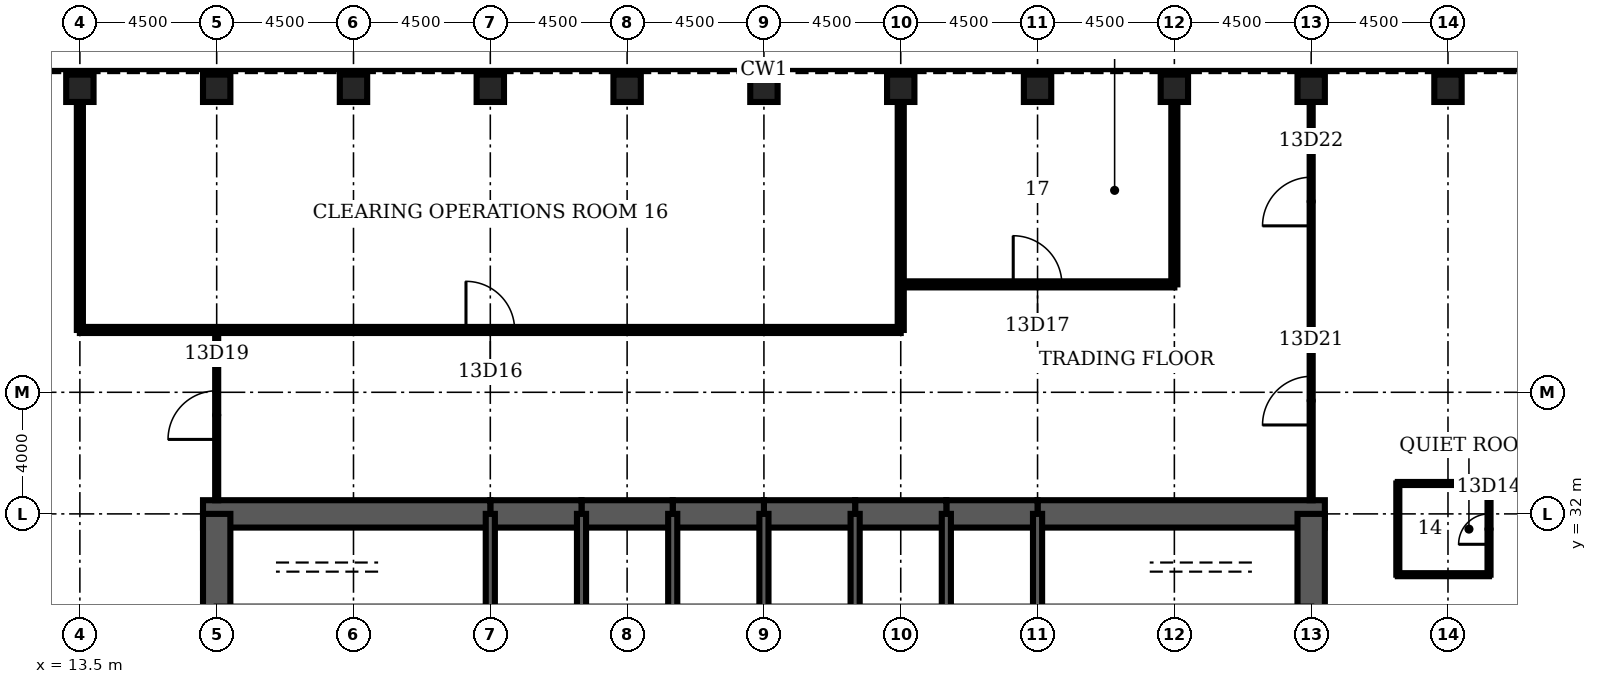
"""IFC4 building model, lengths in metres.
Left out: names, types, materials, properties, quantities, classifications, styles, units other than length and angle.
Written with IfcOpenShell. Run it as: python <this file> out.ifc"""

import sys

from ifc_helpers import new_model, si_unit, direction, frame, frame_2d, origin, origin_2d, place, context, subcontext, project, spatial, rectangle, hollow_rectangle, extrude, element, fill, save


model = new_model("IFC4")
c1 = context("Model", 3, precision=1e-05, world=origin(), true_north=direction((0.0, 1.0)))
c2 = subcontext(c1, "Body", "Model", "MODEL_VIEW")
j1 = project(units=[si_unit("LENGTHUNIT", "METRE"), si_unit("PLANEANGLEUNIT", "RADIAN")], contexts=[c1])
p1 = place(None, origin())
s1 = spatial("IfcSite", under=j1, at=p1, CompositionType="ELEMENT")
p2 = place(p1, origin())
s2 = spatial("IfcBuilding", under=s1, at=p2, CompositionType="ELEMENT")
p3 = place(p2, frame((0.0, 0.0, 63.5)))
s3 = spatial("IfcBuildingStorey", under=s2, at=p3, CompositionType="ELEMENT", Elevation=63.5)
for number, where, z_axis, x_axis in (
    (1, (58.5, 46.0, 0.0), (0.0, 0.0, 1.0), (0.0, 1.0, 0.0)),
    (2, (54.0, 46.0, 0.0), (0.0, 0.0, 1.0), (0.0, 1.0, 0.0)),
    (3, (49.5, 46.0, 0.0), (0.0, 0.0, 1.0), (0.0, 1.0, 0.0)),
    (4, (45.0, 46.0, 0.0), (0.0, 0.0, 1.0), (0.0, 1.0, 0.0)),
    (5, (40.5, 46.0, 0.0), (0.0, 0.0, 1.0), (0.0, 1.0, 0.0)),
    (6, (36.0, 46.0, 0.0), (0.0, 0.0, 1.0), (0.0, 1.0, 0.0)),
    (7, (31.5, 46.0, 0.0), (0.0, 0.0, 1.0), (0.0, 1.0, 0.0)),
    (8, (27.0, 46.0, 0.0), (0.0, 0.0, 1.0), (0.0, 1.0, 0.0)),
    (9, (22.5, 46.0, 0.0), (0.0, 0.0, 1.0), (0.0, 1.0, 0.0)),
    (10, (18.0, 46.0, 0.0), (0.0, 0.0, 1.0), (0.0, 1.0, 0.0)),
    (11, (13.5, 46.0, 0.0), (0.0, 0.0, 1.0), (0.0, 1.0, 0.0)),
):
    element("IfcColumn", number, at=place(p3, frame(where, z_axis=z_axis, x_axis=x_axis)), inside=s3, PredefinedType="COLUMN", context=c2, shape_type="SweptSolid", body=[
        extrude(hollow_rectangle(XDim=0.9, YDim=0.9, WallThickness=0.12, at=origin_2d()), origin(), (0.0, 0.0, 1.0), 4.5),
    ])
p4 = place(p3, frame((54.45, 32.0, 0.0), z_axis=(0.0, 0.0, 1.0), x_axis=(-1.0, 0.0, 0.0)))
e12 = element("IfcWall", 12, at=p4, inside=s3, PredefinedType="SHEAR", context=c2, shape_type="SweptSolid", body=[
    extrude(rectangle(XDim=9.45, YDim=0.9, at=frame_2d((4.725, 0.0))), origin(), (0.0, 0.0, 1.0), 4.5),
])
for number, where, z_axis, x_axis in (
    (13, (45.0, 32.0, 0.0), (0.0, 0.0, 1.0), (-1.0, 0.0, 0.0)),
    (14, (42.0, 32.0, 0.0), (0.0, 0.0, 1.0), (-1.0, 0.0, 0.0)),
    (15, (39.0, 32.0, 0.0), (0.0, 0.0, 1.0), (-1.0, 0.0, 0.0)),
    (16, (36.0, 32.0, 0.0), (0.0, 0.0, 1.0), (-1.0, 0.0, 0.0)),
    (17, (33.0, 32.0, 0.0), (0.0, 0.0, 1.0), (-1.0, 0.0, 0.0)),
    (18, (30.0, 32.0, 0.0), (0.0, 0.0, 1.0), (-1.0, 0.0, 0.0)),
):
    element("IfcWall", number, at=place(p3, frame(where, z_axis=z_axis, x_axis=x_axis)), inside=s3, PredefinedType="SHEAR", context=c2, shape_type="SweptSolid", body=[
        extrude(rectangle(XDim=3.0, YDim=0.9, at=frame_2d((1.5, 0.0))), origin(), (0.0, 0.0, 1.0), 4.5),
    ])
p5 = place(p3, frame((27.0, 32.0, 0.0), z_axis=(0.0, 0.0, 1.0), x_axis=(-1.0, 0.0, 0.0)))
e19 = element("IfcWall", 19, at=p5, inside=s3, PredefinedType="SHEAR", context=c2, shape_type="SweptSolid", body=[
    extrude(rectangle(XDim=9.45, YDim=0.9, at=frame_2d((4.725, 0.0))), origin(), (0.0, 0.0, 1.0), 4.5),
])
for number, where, z_axis, x_axis in (
    (20, (18.0, 32.0, 0.0), (0.0, 0.0, 1.0), (0.0, -1.0, 0.0)),
    (21, (54.0, 28.8, 0.0), (0.0, 0.0, 1.0), (0.0, 1.0, 0.0)),
):
    element("IfcWall", number, at=place(p3, frame(where, z_axis=z_axis, x_axis=x_axis)), inside=s3, PredefinedType="SHEAR", context=c2, shape_type="SweptSolid", body=[
        extrude(rectangle(XDim=3.2, YDim=0.9, at=frame_2d((1.6, 0.0))), origin(), (0.0, 0.0, 1.0), 4.5),
    ])
for number, where, z_axis, x_axis in (
    (22, (27.0, 28.8, 0.0), (0.0, 0.0, 1.0), (0.0, 1.0, 0.0)),
    (23, (30.0, 28.8, 0.0), (0.0, 0.0, 1.0), (0.0, 1.0, 0.0)),
    (24, (33.0, 28.8, 0.0), (0.0, 0.0, 1.0), (0.0, 1.0, 0.0)),
    (25, (36.0, 28.8, 0.0), (0.0, 0.0, 1.0), (0.0, 1.0, 0.0)),
    (26, (39.0, 28.8, 0.0), (0.0, 0.0, 1.0), (0.0, 1.0, 0.0)),
    (27, (42.0, 28.8, 0.0), (0.0, 0.0, 1.0), (0.0, 1.0, 0.0)),
    (28, (45.0, 28.8, 0.0), (0.0, 0.0, 1.0), (0.0, 1.0, 0.0)),
):
    element("IfcWall", number, at=place(p3, frame(where, z_axis=z_axis, x_axis=x_axis)), inside=s3, PredefinedType="SOLIDWALL", context=c2, shape_type="SweptSolid", body=[
        extrude(rectangle(XDim=3.2, YDim=0.3, at=frame_2d((1.6, 0.0))), origin(), (0.0, 0.0, 1.0), 4.5),
    ])
for number, where, z_axis, x_axis in (
    (29, (56.85, 30.0, 0.0), (0.0, 0.0, 1.0), (1.0, 0.0, 0.0)),
    (30, (56.85, 33.0, 0.0), (0.0, 0.0, 1.0), (1.0, 0.0, 0.0)),
):
    element("IfcWall", number, at=place(p3, frame(where, z_axis=z_axis, x_axis=x_axis)), inside=s3, PredefinedType="PARTITIONING", context=c2, shape_type="SweptSolid", body=[
        extrude(rectangle(XDim=3.0, YDim=0.1, at=frame_2d((1.5, 0.0))), origin(), (0.0, 0.0, 1.0), 3.0),
    ])
p6 = place(p3, frame((13.5, 38.05, 0.0), z_axis=(0.0, 0.0, 1.0), x_axis=(1.0, 0.0, 0.0)))
e31 = element("IfcWall", 31, at=p6, inside=s3, PredefinedType="PARTITIONING", context=c2, shape_type="SweptSolid", body=[
    extrude(rectangle(XDim=27.0, YDim=0.2, at=frame_2d((13.5, 0.0))), origin(), (0.0, 0.0, 1.0), 3.0),
])
p7 = place(p6, frame((12.7, 0.0, 0.0)))
e32 = element("IfcOpeningElement", 32, at=p7, cuts=e31, PredefinedType="OPENING", context=c2, shape_type="SweptSolid", body=[
    extrude(rectangle(XDim=1.6, YDim=2.1, at=frame_2d((0.8, 1.05))), frame((0.0, 0.11, 0.0), z_axis=(0.0, -1.0, 0.0), x_axis=(1.0, 0.0, 0.0)), (0.0, 0.0, 1.0), 0.22),
])
p8 = place(p3, frame((40.5, 39.55, 0.0), z_axis=(0.0, 0.0, 1.0), x_axis=(1.0, 0.0, 0.0)))
e33 = element("IfcWall", 33, at=p8, inside=s3, PredefinedType="PARTITIONING", context=c2, shape_type="SweptSolid", body=[
    extrude(rectangle(XDim=9.0, YDim=0.2, at=frame_2d((4.5, 0.0))), origin(), (0.0, 0.0, 1.0), 3.0),
])
p9 = place(p8, frame((3.7, 0.0, 0.0)))
e34 = element("IfcOpeningElement", 34, at=p9, cuts=e33, PredefinedType="OPENING", context=c2, shape_type="SweptSolid", body=[
    extrude(rectangle(XDim=1.6, YDim=2.1, at=frame_2d((0.8, 1.05))), frame((0.0, 0.11, 0.0), z_axis=(0.0, -1.0, 0.0), x_axis=(1.0, 0.0, 0.0)), (0.0, 0.0, 1.0), 0.22),
])
p10 = place(p3, frame((13.5, 38.05, 0.0), z_axis=(0.0, 0.0, 1.0), x_axis=(0.0, 1.0, 0.0)))
e35 = element("IfcWall", 35, at=p10, inside=s3, PredefinedType="PARTITIONING", context=c2, shape_type="SweptSolid", body=[
    extrude(rectangle(XDim=7.5, YDim=0.2, at=frame_2d((3.75, 0.0))), origin(), (0.0, 0.0, 1.0), 3.0),
])
p11 = place(p3, frame((18.0, 32.45, 0.0), z_axis=(0.0, 0.0, 1.0), x_axis=(0.0, 1.0, 0.0)))
e36 = element("IfcWall", 36, at=p11, inside=s3, PredefinedType="PARTITIONING", context=c2, shape_type="SweptSolid", body=[
    extrude(rectangle(XDim=5.6, YDim=0.1, at=frame_2d((2.8, 0.0))), origin(), (0.0, 0.0, 1.0), 3.0),
])
p12 = place(p11, frame((2.0, 0.0, 0.0)))
e37 = element("IfcOpeningElement", 37, at=p12, cuts=e36, PredefinedType="OPENING", context=c2, shape_type="SweptSolid", body=[
    extrude(rectangle(XDim=1.6, YDim=2.1, at=frame_2d((0.8, 1.05))), frame((0.0, 0.06, 0.0), z_axis=(0.0, -1.0, 0.0), x_axis=(1.0, 0.0, 0.0)), (0.0, 0.0, 1.0), 0.12),
])
p13 = place(p3, frame((40.5, 38.05, 0.0), z_axis=(0.0, 0.0, 1.0), x_axis=(0.0, 1.0, 0.0)))
e38 = element("IfcWall", 38, at=p13, inside=s3, PredefinedType="PARTITIONING", context=c2, shape_type="SweptSolid", body=[
    extrude(rectangle(XDim=7.5, YDim=0.2, at=frame_2d((3.75, 0.0))), origin(), (0.0, 0.0, 1.0), 3.0),
])
p14 = place(p3, frame((49.5, 39.55, 0.0), z_axis=(0.0, 0.0, 1.0), x_axis=(0.0, 1.0, 0.0)))
e39 = element("IfcWall", 39, at=p14, inside=s3, PredefinedType="PARTITIONING", context=c2, shape_type="SweptSolid", body=[
    extrude(rectangle(XDim=6.0, YDim=0.2, at=frame_2d((3.0, 0.0))), origin(), (0.0, 0.0, 1.0), 3.0),
])
p15 = place(p3, frame((54.0, 32.45, 0.0), z_axis=(0.0, 0.0, 1.0), x_axis=(0.0, 1.0, 0.0)))
e40 = element("IfcWall", 40, at=p15, inside=s3, PredefinedType="PARTITIONING", context=c2, shape_type="SweptSolid", body=[
    extrude(rectangle(XDim=13.1, YDim=0.1, at=frame_2d((6.55, 0.0))), origin(), (0.0, 0.0, 1.0), 3.0),
])
p16 = place(p15, frame((2.475, 0.0, 0.0)))
e41 = element("IfcOpeningElement", 41, at=p16, cuts=e40, PredefinedType="OPENING", context=c2, shape_type="SweptSolid", body=[
    extrude(rectangle(XDim=1.6, YDim=2.1, at=frame_2d((0.8, 1.05))), frame((0.0, 0.06, 0.0), z_axis=(0.0, -1.0, 0.0), x_axis=(1.0, 0.0, 0.0)), (0.0, 0.0, 1.0), 0.12),
])
p17 = place(p15, frame((9.025, 0.0, 0.0)))
e42 = element("IfcOpeningElement", 42, at=p17, cuts=e40, PredefinedType="OPENING", context=c2, shape_type="SweptSolid", body=[
    extrude(rectangle(XDim=1.6, YDim=2.1, at=frame_2d((0.8, 1.05))), frame((0.0, 0.06, 0.0), z_axis=(0.0, -1.0, 0.0), x_axis=(1.0, 0.0, 0.0)), (0.0, 0.0, 1.0), 0.12),
])
p18 = place(p3, frame((56.85, 30.0, 0.0), z_axis=(0.0, 0.0, 1.0), x_axis=(0.0, 1.0, 0.0)))
e43 = element("IfcWall", 43, at=p18, inside=s3, PredefinedType="PARTITIONING", context=c2, shape_type="SweptSolid", body=[
    extrude(rectangle(XDim=3.0, YDim=0.1, at=frame_2d((1.5, 0.0))), origin(), (0.0, 0.0, 1.0), 3.0),
])
p19 = place(p3, frame((59.85, 30.0, 0.0), z_axis=(0.0, 0.0, 1.0), x_axis=(0.0, 1.0, 0.0)))
e44 = element("IfcWall", 44, at=p19, inside=s3, PredefinedType="PARTITIONING", context=c2, shape_type="SweptSolid", body=[
    extrude(rectangle(XDim=3.0, YDim=0.1, at=frame_2d((1.5, 0.0))), origin(), (0.0, 0.0, 1.0), 3.0),
])
p20 = place(p19, frame((1.0, 0.0, 0.0)))
e45 = element("IfcOpeningElement", 45, at=p20, cuts=e44, PredefinedType="OPENING", context=c2, shape_type="SweptSolid", body=[
    extrude(rectangle(XDim=1.0, YDim=2.1, at=frame_2d((0.5, 1.05))), frame((0.0, 0.06, 0.0), z_axis=(0.0, -1.0, 0.0), x_axis=(1.0, 0.0, 0.0)), (0.0, 0.0, 1.0), 0.12),
])
p21 = place(p20, origin())
e46 = element("IfcDoor", 46, at=p21, inside=s3, OperationType="SINGLE_SWING_LEFT", PredefinedType="DOOR", context=c2, shape_type="SweptSolid", body=[
    extrude(rectangle(XDim=1.0, YDim=2.1, at=frame_2d((0.5, 1.05))), frame((0.0, 0.025, 0.0), z_axis=(0.0, -1.0, 0.0), x_axis=(1.0, 0.0, 0.0)), (0.0, 0.0, 1.0), 0.05),
])
fill(e45, e46)
p22 = place(p7, origin())
e47 = element("IfcDoor", 47, at=p22, inside=s3, OperationType="SINGLE_SWING_LEFT", PredefinedType="DOOR", context=c2, shape_type="SweptSolid", body=[
    extrude(rectangle(XDim=1.6, YDim=2.1, at=frame_2d((0.8, 1.05))), frame((0.0, 0.025, 0.0), z_axis=(0.0, -1.0, 0.0), x_axis=(1.0, 0.0, 0.0)), (0.0, 0.0, 1.0), 0.05),
])
fill(e32, e47)
p23 = place(p9, origin())
e48 = element("IfcDoor", 48, at=p23, inside=s3, OperationType="SINGLE_SWING_LEFT", PredefinedType="DOOR", context=c2, shape_type="SweptSolid", body=[
    extrude(rectangle(XDim=1.6, YDim=2.1, at=frame_2d((0.8, 1.05))), frame((0.0, 0.025, 0.0), z_axis=(0.0, -1.0, 0.0), x_axis=(1.0, 0.0, 0.0)), (0.0, 0.0, 1.0), 0.05),
])
fill(e34, e48)
p24 = place(p12, origin())
e49 = element("IfcDoor", 49, at=p24, inside=s3, OperationType="SINGLE_SWING_LEFT", PredefinedType="DOOR", context=c2, shape_type="SweptSolid", body=[
    extrude(rectangle(XDim=1.6, YDim=2.1, at=frame_2d((0.8, 1.05))), frame((0.0, 0.025, 0.0), z_axis=(0.0, -1.0, 0.0), x_axis=(1.0, 0.0, 0.0)), (0.0, 0.0, 1.0), 0.05),
])
fill(e37, e49)
p25 = place(p16, origin())
e50 = element("IfcDoor", 50, at=p25, inside=s3, OperationType="SINGLE_SWING_LEFT", PredefinedType="DOOR", context=c2, shape_type="SweptSolid", body=[
    extrude(rectangle(XDim=1.6, YDim=2.1, at=frame_2d((0.8, 1.05))), frame((0.0, 0.025, 0.0), z_axis=(0.0, -1.0, 0.0), x_axis=(1.0, 0.0, 0.0)), (0.0, 0.0, 1.0), 0.05),
])
fill(e41, e50)
p26 = place(p17, origin())
e51 = element("IfcDoor", 51, at=p26, inside=s3, OperationType="SINGLE_SWING_LEFT", PredefinedType="DOOR", context=c2, shape_type="SweptSolid", body=[
    extrude(rectangle(XDim=1.6, YDim=2.1, at=frame_2d((0.8, 1.05))), frame((0.0, 0.025, 0.0), z_axis=(0.0, -1.0, 0.0), x_axis=(1.0, 0.0, 0.0)), (0.0, 0.0, 1.0), 0.05),
])
fill(e42, e51)
save(model, sys.argv[1])
